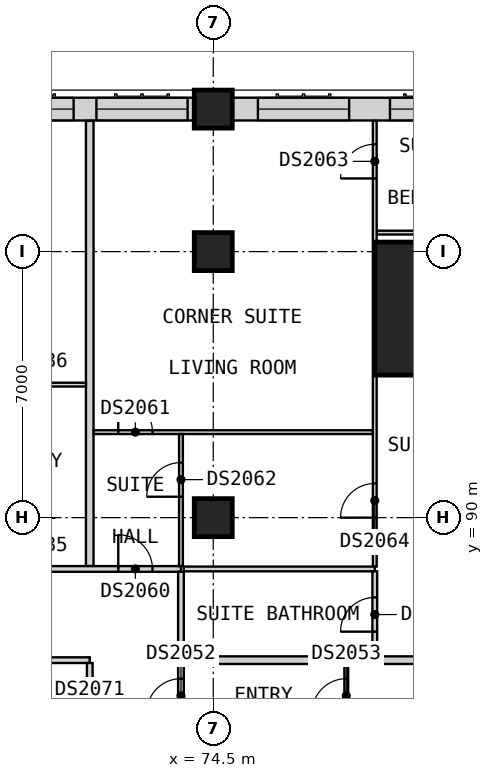
"""IFC4 building model, lengths in metres.
Left out: names, types, materials, properties, quantities, classifications, styles, units other than length and angle.
Written with IfcOpenShell. Run it as: python <this file> out.ifc"""

import sys

from ifc_helpers import new_model, si_unit, direction, frame, frame_2d, origin, origin_2d, place, context, subcontext, project, spatial, rectangle, extrude, element, fill, save


model = new_model("IFC4")
c1 = context("Model", 3, precision=1e-05, world=origin(), true_north=direction((0.0, 1.0)))
c2 = subcontext(c1, "Body", "Model", "MODEL_VIEW")
j1 = project(units=[si_unit("LENGTHUNIT", "METRE"), si_unit("PLANEANGLEUNIT", "RADIAN")], contexts=[c1])
p1 = place(None, origin())
s1 = spatial("IfcSite", under=j1, at=p1, CompositionType="ELEMENT")
p2 = place(p1, origin())
s2 = spatial("IfcBuilding", under=s1, at=p2, CompositionType="ELEMENT")
p3 = place(p2, frame((0.0, 0.0, 133.8)))
s3 = spatial("IfcBuildingStorey", under=s2, at=p3, CompositionType="ELEMENT", Elevation=133.8)
for number, where, z_axis, x_axis in (
    (1, (74.5, 100.75, 0.0), (0.0, 0.0, 1.0), (1.0, 0.0, 0.0)),
    (2, (74.5, 90.0, 0.0), (0.0, 0.0, 1.0), (1.0, 0.0, 0.0)),
    (3, (74.5, 97.0, 0.0), (0.0, 0.0, 1.0), (1.0, 0.0, 0.0)),
):
    element("IfcColumn", number, at=place(p3, frame(where, z_axis=z_axis, x_axis=x_axis)), inside=s3, PredefinedType="COLUMN", context=c2, shape_type="SweptSolid", body=[
        extrude(rectangle(XDim=1.0, YDim=1.0, at=origin_2d()), origin(), (0.0, 0.0, 1.0), 3.6),
    ])
p4 = place(p3, frame((80.5, 95.5, 0.0), z_axis=(0.0, 0.0, 1.0), x_axis=(1.0, 0.0, 0.0)))
e4 = element("IfcColumn", 4, at=p4, inside=s3, PredefinedType="COLUMN", context=c2, shape_type="SweptSolid", body=[
    extrude(rectangle(XDim=3.5, YDim=3.5, at=origin_2d()), origin(), (0.0, 0.0, 1.0), 3.6),
])
p5 = place(p3, frame((82.25, 100.75, 0.0), z_axis=(0.0, 0.0, 1.0), x_axis=(-1.0, 0.0, 0.0)))
e5 = element("IfcWall", 5, at=p5, inside=s3, PredefinedType="SOLIDWALL", context=c2, shape_type="SweptSolid", body=[
    extrude(rectangle(XDim=7.25, YDim=0.6, at=frame_2d((3.625, 0.0))), origin(), (0.0, 0.0, 1.0), 2.85),
])
p6 = place(p5, frame((4.175, 0.0, 0.8)))
e6 = element("IfcOpeningElement", 6, at=p6, cuts=e5, PredefinedType="OPENING", context=c2, shape_type="SweptSolid", body=[
    extrude(rectangle(XDim=2.4, YDim=1.8, at=frame_2d((1.2, 0.9))), frame((0.0, 0.31, 0.0), z_axis=(0.0, -1.0, 0.0), x_axis=(1.0, 0.0, 0.0)), (0.0, 0.0, 1.0), 0.62),
])
p7 = place(p5, frame((1.3, 0.0, 0.8)))
e7 = element("IfcOpeningElement", 7, at=p7, cuts=e5, PredefinedType="OPENING", context=c2, shape_type="SweptSolid", body=[
    extrude(rectangle(XDim=1.8, YDim=1.8, at=frame_2d((0.9, 0.9))), frame((0.0, 0.31, 0.0), z_axis=(0.0, -1.0, 0.0), x_axis=(1.0, 0.0, 0.0)), (0.0, 0.0, 1.0), 0.62),
])
p8 = place(p3, frame((74.0, 100.75, 0.0), z_axis=(0.0, 0.0, 1.0), x_axis=(-1.0, 0.0, 0.0)))
e8 = element("IfcWall", 8, at=p8, inside=s3, PredefinedType="SOLIDWALL", context=c2, shape_type="SweptSolid", body=[
    extrude(rectangle(XDim=6.0, YDim=0.6, at=frame_2d((3.0, 0.0))), origin(), (0.0, 0.0, 1.0), 2.85),
])
p9 = place(p8, frame((3.175, 0.0, 0.8)))
e9 = element("IfcOpeningElement", 9, at=p9, cuts=e8, PredefinedType="OPENING", context=c2, shape_type="SweptSolid", body=[
    extrude(rectangle(XDim=2.4, YDim=1.8, at=frame_2d((1.2, 0.9))), frame((0.0, 0.31, 0.0), z_axis=(0.0, -1.0, 0.0), x_axis=(1.0, 0.0, 0.0)), (0.0, 0.0, 1.0), 0.62),
])
p10 = place(p8, frame((0.175, 0.0, 0.8)))
e10 = element("IfcOpeningElement", 10, at=p10, cuts=e8, PredefinedType="OPENING", context=c2, shape_type="SweptSolid", body=[
    extrude(rectangle(XDim=2.4, YDim=1.8, at=frame_2d((1.2, 0.9))), frame((0.0, 0.31, 0.0), z_axis=(0.0, -1.0, 0.0), x_axis=(1.0, 0.0, 0.0)), (0.0, 0.0, 1.0), 0.62),
])
for number, where, z_axis, x_axis in (
    (11, (73.725, 86.25, 0.0), (0.0, 0.0, 1.0), (1.0, 0.0, 0.0)),
    (12, (71.25, 88.725, 0.0), (0.0, 0.0, 1.0), (0.0, 1.0, 0.0)),
):
    element("IfcWall", number, at=place(p3, frame(where, z_axis=z_axis, x_axis=x_axis)), inside=s3, PredefinedType="PARTITIONING", context=c2, shape_type="SweptSolid", body=[
        extrude(rectangle(XDim=11.715, YDim=0.2, at=frame_2d((5.857, 0.0))), origin(), (0.0, 0.0, 1.0), 3.35),
    ])
p11 = place(p3, frame((33.75, 86.25, 0.0), z_axis=(0.0, 0.0, 1.0), x_axis=(1.0, 0.0, 0.0)))
e13 = element("IfcWall", 13, at=p11, inside=s3, PredefinedType="PARTITIONING", context=c2, shape_type="SweptSolid", body=[
    extrude(rectangle(XDim=37.5, YDim=0.15, at=frame_2d((18.75, 0.0))), origin(), (0.0, 0.0, 1.0), 3.35),
])
p12 = place(p11, frame((1.8, 0.0, 0.0)))
e14 = element("IfcOpeningElement", 14, at=p12, cuts=e13, PredefinedType="OPENING", context=c2, shape_type="SweptSolid", body=[
    extrude(rectangle(XDim=0.9, YDim=2.1, at=frame_2d((0.45, 1.05))), frame((0.0, 0.085, 0.0), z_axis=(0.0, -1.0, 0.0), x_axis=(1.0, 0.0, 0.0)), (0.0, 0.0, 1.0), 0.17),
])
p13 = place(p3, frame((33.75, 88.65, 0.0), z_axis=(0.0, 0.0, 1.0), x_axis=(1.0, 0.0, 0.0)))
e15 = element("IfcWall", 15, at=p13, inside=s3, PredefinedType="PARTITIONING", context=c2, shape_type="SweptSolid", body=[
    extrude(rectangle(XDim=39.9, YDim=0.15, at=frame_2d((19.95, 0.0))), origin(), (0.0, 0.0, 1.0), 3.35),
])
p14 = place(p13, frame((5.175, 0.0, 0.0)))
e16 = element("IfcOpeningElement", 16, at=p14, cuts=e15, PredefinedType="OPENING", context=c2, shape_type="SweptSolid", body=[
    extrude(rectangle(XDim=0.9, YDim=2.1, at=frame_2d((0.45, 1.05))), frame((0.0, 0.085, 0.0), z_axis=(0.0, -1.0, 0.0), x_axis=(1.0, 0.0, 0.0)), (0.0, 0.0, 1.0), 0.17),
])
p15 = place(p13, frame((9.3, 0.0, 0.0)))
e17 = element("IfcOpeningElement", 17, at=p15, cuts=e15, PredefinedType="OPENING", context=c2, shape_type="SweptSolid", body=[
    extrude(rectangle(XDim=0.9, YDim=2.1, at=frame_2d((0.45, 1.05))), frame((0.0, 0.085, 0.0), z_axis=(0.0, -1.0, 0.0), x_axis=(1.0, 0.0, 0.0)), (0.0, 0.0, 1.0), 0.17),
])
p16 = place(p13, frame((21.113, 0.0, 0.0)))
e18 = element("IfcOpeningElement", 18, at=p16, cuts=e15, PredefinedType="OPENING", context=c2, shape_type="SweptSolid", body=[
    extrude(rectangle(XDim=0.9, YDim=2.1, at=frame_2d((0.45, 1.05))), frame((0.0, 0.085, 0.0), z_axis=(0.0, -1.0, 0.0), x_axis=(1.0, 0.0, 0.0)), (0.0, 0.0, 1.0), 0.17),
])
p17 = place(p13, frame((28.05, 0.0, 0.0)))
e19 = element("IfcOpeningElement", 19, at=p17, cuts=e15, PredefinedType="OPENING", context=c2, shape_type="SweptSolid", body=[
    extrude(rectangle(XDim=0.9, YDim=2.1, at=frame_2d((0.45, 1.05))), frame((0.0, 0.085, 0.0), z_axis=(0.0, -1.0, 0.0), x_axis=(1.0, 0.0, 0.0)), (0.0, 0.0, 1.0), 0.17),
])
p18 = place(p13, frame((35.55, 0.0, 0.0)))
e20 = element("IfcOpeningElement", 20, at=p18, cuts=e15, PredefinedType="OPENING", context=c2, shape_type="SweptSolid", body=[
    extrude(rectangle(XDim=0.9, YDim=2.1, at=frame_2d((0.45, 1.05))), frame((0.0, 0.085, 0.0), z_axis=(0.0, -1.0, 0.0), x_axis=(1.0, 0.0, 0.0)), (0.0, 0.0, 1.0), 0.17),
])
p19 = place(p13, frame((38.25, 0.0, 0.0)))
e21 = element("IfcOpeningElement", 21, at=p19, cuts=e15, PredefinedType="OPENING", context=c2, shape_type="SweptSolid", body=[
    extrude(rectangle(XDim=0.9, YDim=2.1, at=frame_2d((0.45, 1.05))), frame((0.0, 0.085, 0.0), z_axis=(0.0, -1.0, 0.0), x_axis=(1.0, 0.0, 0.0)), (0.0, 0.0, 1.0), 0.17),
])
p20 = place(p3, frame((71.25, 78.075, 0.0), z_axis=(0.0, 0.0, 1.0), x_axis=(0.0, 1.0, 0.0)))
e22 = element("IfcWall", 22, at=p20, inside=s3, PredefinedType="PARTITIONING", context=c2, shape_type="SweptSolid", body=[
    extrude(rectangle(XDim=8.1, YDim=0.15, at=frame_2d((4.05, 0.0))), origin(), (0.0, 0.0, 1.0), 3.35),
])
p21 = place(p20, frame((5.85, 0.0, 0.0)))
e23 = element("IfcOpeningElement", 23, at=p21, cuts=e22, PredefinedType="OPENING", context=c2, shape_type="SweptSolid", body=[
    extrude(rectangle(XDim=0.9, YDim=2.1, at=frame_2d((0.45, 1.05))), frame((0.0, 0.085, 0.0), z_axis=(0.0, -1.0, 0.0), x_axis=(1.0, 0.0, 0.0)), (0.0, 0.0, 1.0), 0.17),
])
p22 = place(p20, frame((1.725, 0.0, 0.0)))
e24 = element("IfcOpeningElement", 24, at=p22, cuts=e22, PredefinedType="OPENING", context=c2, shape_type="SweptSolid", body=[
    extrude(rectangle(XDim=0.9, YDim=2.1, at=frame_2d((0.45, 1.05))), frame((0.0, 0.085, 0.0), z_axis=(0.0, -1.0, 0.0), x_axis=(1.0, 0.0, 0.0)), (0.0, 0.0, 1.0), 0.17),
])
p23 = place(p3, frame((73.65, 50.175, 0.0), z_axis=(0.0, 0.0, 1.0), x_axis=(0.0, 1.0, 0.0)))
e25 = element("IfcWall", 25, at=p23, inside=s3, PredefinedType="PARTITIONING", context=c2, shape_type="SweptSolid", body=[
    extrude(rectangle(XDim=38.4, YDim=0.15, at=frame_2d((19.2, 0.0))), origin(), (0.0, 0.0, 1.0), 3.35),
])
p24 = place(p23, frame((7.875, 0.0, 0.0)))
e26 = element("IfcOpeningElement", 26, at=p24, cuts=e25, PredefinedType="OPENING", context=c2, shape_type="SweptSolid", body=[
    extrude(rectangle(XDim=0.9, YDim=2.1, at=frame_2d((0.45, 1.05))), frame((0.0, 0.085, 0.0), z_axis=(0.0, -1.0, 0.0), x_axis=(1.0, 0.0, 0.0)), (0.0, 0.0, 1.0), 0.17),
])
p25 = place(p23, frame((12.188, 0.0, 0.0)))
e27 = element("IfcOpeningElement", 27, at=p25, cuts=e25, PredefinedType="OPENING", context=c2, shape_type="SweptSolid", body=[
    extrude(rectangle(XDim=0.9, YDim=2.1, at=frame_2d((0.45, 1.05))), frame((0.0, 0.085, 0.0), z_axis=(0.0, -1.0, 0.0), x_axis=(1.0, 0.0, 0.0)), (0.0, 0.0, 1.0), 0.17),
])
p26 = place(p23, frame((15.375, 0.0, 0.0)))
e28 = element("IfcOpeningElement", 28, at=p26, cuts=e25, PredefinedType="OPENING", context=c2, shape_type="SweptSolid", body=[
    extrude(rectangle(XDim=0.9, YDim=2.1, at=frame_2d((0.45, 1.05))), frame((0.0, 0.085, 0.0), z_axis=(0.0, -1.0, 0.0), x_axis=(1.0, 0.0, 0.0)), (0.0, 0.0, 1.0), 0.17),
])
p27 = place(p23, frame((30.375, 0.0, 0.0)))
e29 = element("IfcOpeningElement", 29, at=p27, cuts=e25, PredefinedType="OPENING", context=c2, shape_type="SweptSolid", body=[
    extrude(rectangle(XDim=0.9, YDim=2.1, at=frame_2d((0.45, 1.05))), frame((0.0, 0.085, 0.0), z_axis=(0.0, -1.0, 0.0), x_axis=(1.0, 0.0, 0.0)), (0.0, 0.0, 1.0), 0.17),
])
p28 = place(p23, frame((34.688, 0.0, 0.0)))
e30 = element("IfcOpeningElement", 30, at=p28, cuts=e25, PredefinedType="OPENING", context=c2, shape_type="SweptSolid", body=[
    extrude(rectangle(XDim=0.9, YDim=2.1, at=frame_2d((0.45, 1.05))), frame((0.0, 0.085, 0.0), z_axis=(0.0, -1.0, 0.0), x_axis=(1.0, 0.0, 0.0)), (0.0, 0.0, 1.0), 0.17),
])
p29 = place(p3, frame((71.35, 92.25, 0.0), z_axis=(0.0, 0.0, 1.0), x_axis=(1.0, 0.0, 0.0)))
e31 = element("IfcWall", 31, at=p29, inside=s3, PredefinedType="PARTITIONING", context=c2, shape_type="SweptSolid", body=[
    extrude(rectangle(XDim=7.35, YDim=0.1, at=frame_2d((3.675, 0.0))), origin(), (0.0, 0.0, 1.0), 3.35),
])
p30 = place(p29, frame((0.65, 0.0, 0.0)))
e32 = element("IfcOpeningElement", 32, at=p30, cuts=e31, PredefinedType="OPENING", context=c2, shape_type="SweptSolid", body=[
    extrude(rectangle(XDim=0.9, YDim=2.1, at=frame_2d((0.45, 1.05))), frame((0.0, 0.06, 0.0), z_axis=(0.0, -1.0, 0.0), x_axis=(1.0, 0.0, 0.0)), (0.0, 0.0, 1.0), 0.12),
])
p31 = place(p3, frame((68.312, 93.5, 0.0), z_axis=(0.0, 0.0, 1.0), x_axis=(1.0, 0.0, 0.0)))
e33 = element("IfcWall", 33, at=p31, inside=s3, PredefinedType="PARTITIONING", context=c2, shape_type="SweptSolid", body=[
    extrude(rectangle(XDim=2.837, YDim=0.1, at=frame_2d((1.419, 0.0))), origin(), (0.0, 0.0, 1.0), 3.35),
])
p32 = place(p31, frame((0.988, 0.0, 0.0)))
e34 = element("IfcOpeningElement", 34, at=p32, cuts=e33, PredefinedType="OPENING", context=c2, shape_type="SweptSolid", body=[
    extrude(rectangle(XDim=0.9, YDim=2.1, at=frame_2d((0.45, 1.05))), frame((0.0, 0.06, 0.0), z_axis=(0.0, -1.0, 0.0), x_axis=(1.0, 0.0, 0.0)), (0.0, 0.0, 1.0), 0.12),
])
p33 = place(p3, frame((78.8, 97.5, 0.0), z_axis=(0.0, 0.0, 1.0), x_axis=(1.0, 0.0, 0.0)))
e35 = element("IfcWall", 35, at=p33, inside=s3, PredefinedType="PARTITIONING", context=c2, shape_type="SweptSolid", body=[
    extrude(rectangle(XDim=2.64, YDim=0.1, at=frame_2d((1.32, 0.0))), origin(), (0.0, 0.0, 1.0), 3.35),
])
p34 = place(p3, frame((73.65, 88.725, 0.0), z_axis=(0.0, 0.0, 1.0), x_axis=(0.0, 1.0, 0.0)))
e36 = element("IfcWall", 36, at=p34, inside=s3, PredefinedType="PARTITIONING", context=c2, shape_type="SweptSolid", body=[
    extrude(rectangle(XDim=3.475, YDim=0.1, at=frame_2d((1.737, 0.0))), origin(), (0.0, 0.0, 1.0), 3.35),
])
p35 = place(p34, frame((1.825, 0.0, 0.0)))
e37 = element("IfcOpeningElement", 37, at=p35, cuts=e36, PredefinedType="OPENING", context=c2, shape_type="SweptSolid", body=[
    extrude(rectangle(XDim=0.9, YDim=2.1, at=frame_2d((0.45, 1.05))), frame((0.0, 0.06, 0.0), z_axis=(0.0, -1.0, 0.0), x_axis=(1.0, 0.0, 0.0)), (0.0, 0.0, 1.0), 0.12),
])
p36 = place(p3, frame((78.0, 84.438, 0.0), z_axis=(0.0, 0.0, 1.0), x_axis=(0.0, 1.0, 0.0)))
e38 = element("IfcWall", 38, at=p36, inside=s3, PredefinedType="PARTITIONING", context=c2, shape_type="SweptSolid", body=[
    extrude(rectangle(XDim=1.712, YDim=0.1, at=frame_2d((0.856, 0.0))), origin(), (0.0, 0.0, 1.0), 3.35),
])
p37 = place(p36, frame((0.425, 0.0, 0.0)))
e39 = element("IfcOpeningElement", 39, at=p37, cuts=e38, PredefinedType="OPENING", context=c2, shape_type="SweptSolid", body=[
    extrude(rectangle(XDim=0.9, YDim=2.1, at=frame_2d((0.45, 1.05))), frame((0.0, 0.06, 0.0), z_axis=(0.0, -1.0, 0.0), x_axis=(1.0, 0.0, 0.0)), (0.0, 0.0, 1.0), 0.12),
])
p38 = place(p3, frame((78.75, 88.712, 0.0), z_axis=(0.0, 0.0, 1.0), x_axis=(0.0, 1.0, 0.0)))
e40 = element("IfcWall", 40, at=p38, inside=s3, PredefinedType="PARTITIONING", context=c2, shape_type="SweptSolid", body=[
    extrude(rectangle(XDim=11.728, YDim=0.1, at=frame_2d((5.864, 0.0))), origin(), (0.0, 0.0, 1.0), 3.35),
])
p39 = place(p38, frame((10.212, 0.0, 0.0)))
e41 = element("IfcOpeningElement", 41, at=p39, cuts=e40, PredefinedType="OPENING", context=c2, shape_type="SweptSolid", body=[
    extrude(rectangle(XDim=0.9, YDim=2.1, at=frame_2d((0.45, 1.05))), frame((0.0, 0.06, 0.0), z_axis=(0.0, -1.0, 0.0), x_axis=(1.0, 0.0, 0.0)), (0.0, 0.0, 1.0), 0.12),
])
p40 = place(p38, frame((1.288, 0.0, 0.0)))
e42 = element("IfcOpeningElement", 42, at=p40, cuts=e40, PredefinedType="OPENING", context=c2, shape_type="SweptSolid", body=[
    extrude(rectangle(XDim=0.9, YDim=2.1, at=frame_2d((0.45, 1.05))), frame((0.0, 0.06, 0.0), z_axis=(0.0, -1.0, 0.0), x_axis=(1.0, 0.0, 0.0)), (0.0, 0.0, 1.0), 0.12),
])
p41 = place(p3, frame((73.725, 88.65, 0.0), z_axis=(0.0, 0.0, 1.0), x_axis=(1.0, 0.0, 0.0)))
e43 = element("IfcWall", 43, at=p41, inside=s3, PredefinedType="PARTITIONING", context=c2, shape_type="SweptSolid", body=[
    extrude(rectangle(XDim=5.025, YDim=0.125, at=frame_2d((2.512, 0.0))), origin(), (0.0, 0.0, 1.0), 3.35),
])
p42 = place(p3, frame((78.75, 86.35, 0.0), z_axis=(0.0, 0.0, 1.0), x_axis=(0.0, 1.0, 0.0)))
e44 = element("IfcWall", 44, at=p42, inside=s3, PredefinedType="PARTITIONING", context=c2, shape_type="SweptSolid", body=[
    extrude(rectangle(XDim=2.237, YDim=0.125, at=frame_2d((1.119, 0.0))), origin(), (0.0, 0.0, 1.0), 3.35),
])
p43 = place(p42, frame((0.65, 0.0, 0.0)))
e45 = element("IfcOpeningElement", 45, at=p43, cuts=e44, PredefinedType="OPENING", context=c2, shape_type="SweptSolid", body=[
    extrude(rectangle(XDim=0.9, YDim=2.1, at=frame_2d((0.45, 1.05))), frame((0.0, 0.073, 0.0), z_axis=(0.0, -1.0, 0.0), x_axis=(1.0, 0.0, 0.0)), (0.0, 0.0, 1.0), 0.145),
])
p44 = place(p6, origin())
e46 = element("IfcWindow", 46, at=p44, inside=s3, PartitioningType="SINGLE_PANEL", PredefinedType="WINDOW", context=c2, shape_type="SweptSolid", body=[
    extrude(rectangle(XDim=2.4, YDim=1.8, at=frame_2d((1.2, 0.9))), frame((0.0, -0.07, 0.0), z_axis=(0.0, -1.0, 0.0), x_axis=(1.0, 0.0, 0.0)), (0.0, 0.0, 1.0), 0.06),
])
fill(e6, e46)
p45 = place(p7, origin())
e47 = element("IfcWindow", 47, at=p45, inside=s3, PartitioningType="SINGLE_PANEL", PredefinedType="WINDOW", context=c2, shape_type="SweptSolid", body=[
    extrude(rectangle(XDim=1.8, YDim=1.8, at=frame_2d((0.9, 0.9))), frame((0.0, -0.07, 0.0), z_axis=(0.0, -1.0, 0.0), x_axis=(1.0, 0.0, 0.0)), (0.0, 0.0, 1.0), 0.06),
])
fill(e7, e47)
p46 = place(p9, origin())
e48 = element("IfcWindow", 48, at=p46, inside=s3, PartitioningType="SINGLE_PANEL", PredefinedType="WINDOW", context=c2, shape_type="SweptSolid", body=[
    extrude(rectangle(XDim=2.4, YDim=1.8, at=frame_2d((1.2, 0.9))), frame((0.0, -0.07, 0.0), z_axis=(0.0, -1.0, 0.0), x_axis=(1.0, 0.0, 0.0)), (0.0, 0.0, 1.0), 0.06),
])
fill(e9, e48)
p47 = place(p10, origin())
e49 = element("IfcWindow", 49, at=p47, inside=s3, PartitioningType="SINGLE_PANEL", PredefinedType="WINDOW", context=c2, shape_type="SweptSolid", body=[
    extrude(rectangle(XDim=2.4, YDim=1.8, at=frame_2d((1.2, 0.9))), frame((0.0, -0.07, 0.0), z_axis=(0.0, -1.0, 0.0), x_axis=(1.0, 0.0, 0.0)), (0.0, 0.0, 1.0), 0.06),
])
fill(e10, e49)
p48 = place(p28, origin())
e50 = element("IfcDoor", 50, at=p48, inside=s3, OperationType="SINGLE_SWING_RIGHT", PredefinedType="DOOR", context=c2, shape_type="SweptSolid", body=[
    extrude(rectangle(XDim=0.9, YDim=2.1, at=frame_2d((0.45, 1.05))), frame((0.0, 0.025, 0.0), z_axis=(0.0, -1.0, 0.0), x_axis=(1.0, 0.0, 0.0)), (0.0, 0.0, 1.0), 0.05),
])
fill(e30, e50)
p49 = place(p37, origin())
e51 = element("IfcDoor", 51, at=p49, inside=s3, OperationType="SINGLE_SWING_LEFT", PredefinedType="DOOR", context=c2, shape_type="SweptSolid", body=[
    extrude(rectangle(XDim=0.9, YDim=2.1, at=frame_2d((0.45, 1.05))), frame((0.0, 0.025, 0.0), z_axis=(0.0, -1.0, 0.0), x_axis=(1.0, 0.0, 0.0)), (0.0, 0.0, 1.0), 0.05),
])
fill(e39, e51)
p50 = place(p19, origin())
e52 = element("IfcDoor", 52, at=p50, inside=s3, OperationType="SINGLE_SWING_RIGHT", PredefinedType="DOOR", context=c2, shape_type="SweptSolid", body=[
    extrude(rectangle(XDim=0.9, YDim=2.1, at=frame_2d((0.45, 1.05))), frame((0.0, 0.025, 0.0), z_axis=(0.0, -1.0, 0.0), x_axis=(1.0, 0.0, 0.0)), (0.0, 0.0, 1.0), 0.05),
])
fill(e21, e52)
p51 = place(p30, origin())
e53 = element("IfcDoor", 53, at=p51, inside=s3, OperationType="SINGLE_SWING_LEFT", PredefinedType="DOOR", context=c2, shape_type="SweptSolid", body=[
    extrude(rectangle(XDim=0.9, YDim=2.1, at=frame_2d((0.45, 1.05))), frame((0.0, 0.025, 0.0), z_axis=(0.0, -1.0, 0.0), x_axis=(1.0, 0.0, 0.0)), (0.0, 0.0, 1.0), 0.05),
])
fill(e32, e53)
p52 = place(p35, origin())
e54 = element("IfcDoor", 54, at=p52, inside=s3, OperationType="SINGLE_SWING_RIGHT", PredefinedType="DOOR", context=c2, shape_type="SweptSolid", body=[
    extrude(rectangle(XDim=0.9, YDim=2.1, at=frame_2d((0.45, 1.05))), frame((0.0, 0.025, 0.0), z_axis=(0.0, -1.0, 0.0), x_axis=(1.0, 0.0, 0.0)), (0.0, 0.0, 1.0), 0.05),
])
fill(e37, e54)
p53 = place(p39, origin())
e55 = element("IfcDoor", 55, at=p53, inside=s3, OperationType="SINGLE_SWING_LEFT", PredefinedType="DOOR", context=c2, shape_type="SweptSolid", body=[
    extrude(rectangle(XDim=0.9, YDim=2.1, at=frame_2d((0.45, 1.05))), frame((0.0, 0.025, 0.0), z_axis=(0.0, -1.0, 0.0), x_axis=(1.0, 0.0, 0.0)), (0.0, 0.0, 1.0), 0.05),
])
fill(e41, e55)
p54 = place(p40, origin())
e56 = element("IfcDoor", 56, at=p54, inside=s3, OperationType="SINGLE_SWING_RIGHT", PredefinedType="DOOR", context=c2, shape_type="SweptSolid", body=[
    extrude(rectangle(XDim=0.9, YDim=2.1, at=frame_2d((0.45, 1.05))), frame((0.0, 0.025, 0.0), z_axis=(0.0, -1.0, 0.0), x_axis=(1.0, 0.0, 0.0)), (0.0, 0.0, 1.0), 0.05),
])
fill(e42, e56)
p55 = place(p43, origin())
e57 = element("IfcDoor", 57, at=p55, inside=s3, OperationType="SINGLE_SWING_LEFT", PredefinedType="DOOR", context=c2, shape_type="SweptSolid", body=[
    extrude(rectangle(XDim=0.9, YDim=2.1, at=frame_2d((0.45, 1.05))), frame((0.0, 0.025, 0.0), z_axis=(0.0, -1.0, 0.0), x_axis=(1.0, 0.0, 0.0)), (0.0, 0.0, 1.0), 0.05),
])
fill(e45, e57)
save(model, sys.argv[1])
